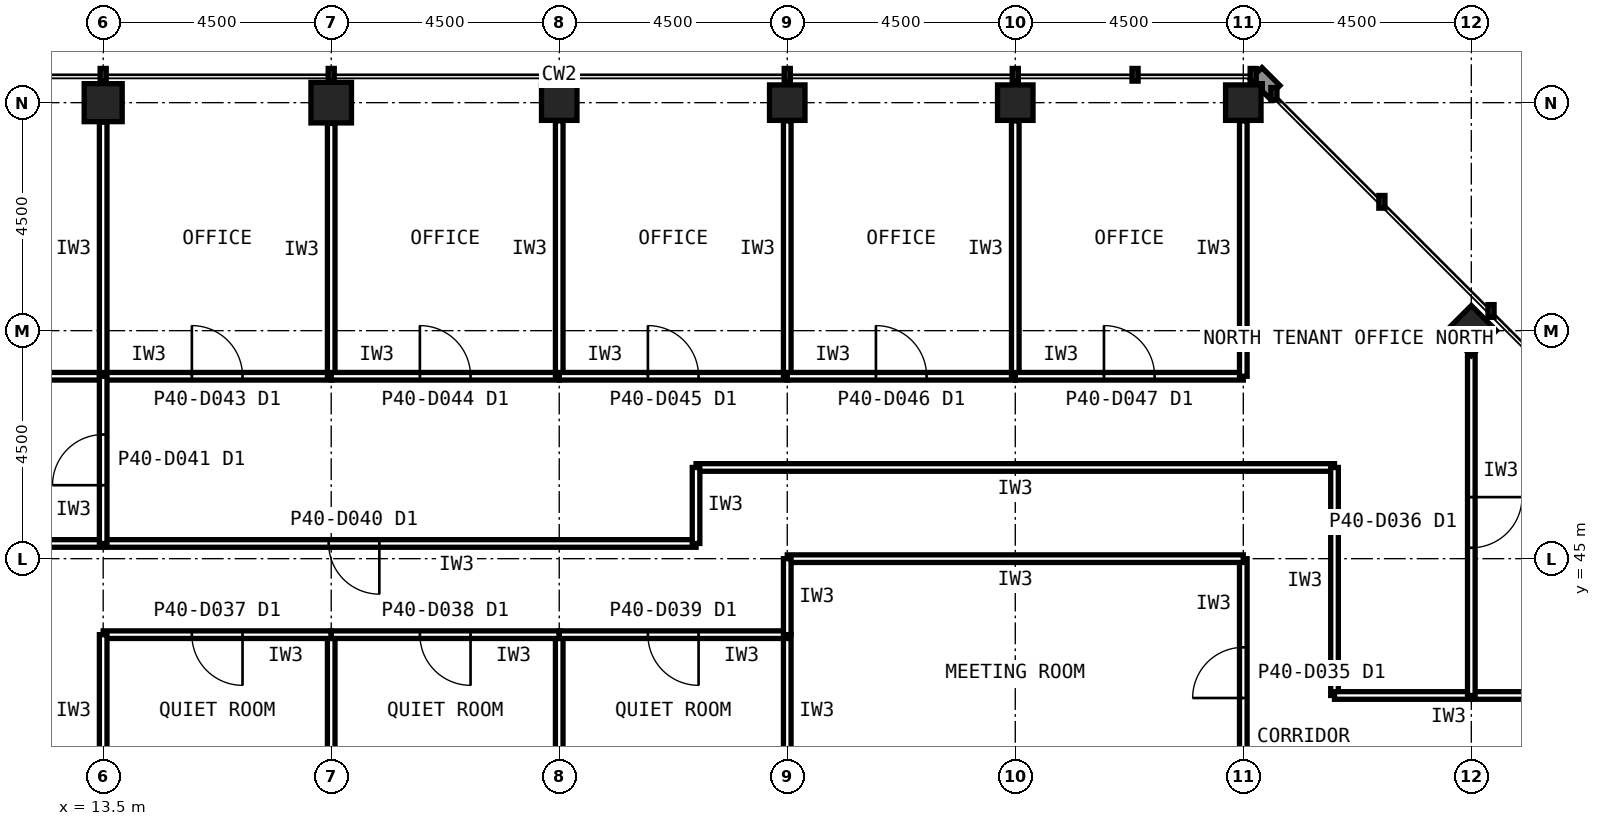
"""IFC4 building model, lengths in metres.
Left out: names, types, materials, properties, quantities, classifications, styles, units other than length and angle.
Written with IfcOpenShell. Run it as: python <this file> out.ifc"""

import sys

from ifc_helpers import new_model, si_unit, direction, frame, frame_2d, origin, origin_2d, place, context, subcontext, project, spatial, rectangle, hollow_rectangle, extrude, element, fill, save


model = new_model("IFC4")
c1 = context("Model", 3, precision=1e-05, world=origin(), true_north=direction((0.0, 1.0)))
c2 = subcontext(c1, "Body", "Model", "MODEL_VIEW")
j1 = project(units=[si_unit("LENGTHUNIT", "METRE"), si_unit("PLANEANGLEUNIT", "RADIAN")], contexts=[c1])
p1 = place(None, origin())
s1 = spatial("IfcSite", under=j1, at=p1, CompositionType="ELEMENT")
p2 = place(p1, origin())
s2 = spatial("IfcBuilding", under=s1, at=p2, CompositionType="ELEMENT")
p3 = place(p2, frame((0.0, 0.0, 167.6)))
s3 = spatial("IfcBuildingStorey", under=s2, at=p3, CompositionType="ELEMENT", Elevation=167.6)
for number, where, z_axis, x_axis in (
    (1, (36.0, 54.0, 0.0), (0.0, 0.0, 1.0), (1.0, 0.0, 0.0)),
    (2, (31.5, 54.0, 0.0), (0.0, 0.0, 1.0), (1.0, 0.0, 0.0)),
    (3, (27.0, 54.0, 0.0), (0.0, 0.0, 1.0), (1.0, 0.0, 0.0)),
    (4, (22.5, 54.0, 0.0), (0.0, 0.0, 1.0), (1.0, 0.0, 0.0)),
):
    element("IfcColumn", number, at=place(p3, frame(where, z_axis=z_axis, x_axis=x_axis)), inside=s3, PredefinedType="COLUMN", context=c2, shape_type="SweptSolid", body=[
        extrude(hollow_rectangle(XDim=0.7, YDim=0.7, WallThickness=0.036, at=origin_2d()), origin(), (0.0, 0.0, 1.0), 4.0),
    ])
p4 = place(p3, frame((18.0, 54.0, 0.0), z_axis=(0.0, 0.0, 1.0), x_axis=(1.0, 0.0, 0.0)))
e5 = element("IfcColumn", 5, at=p4, inside=s3, PredefinedType="COLUMN", context=c2, shape_type="SweptSolid", body=[
    extrude(hollow_rectangle(XDim=0.8, YDim=0.8, WallThickness=0.045, at=origin_2d()), origin(), (0.0, 0.0, 1.0), 4.0),
])
p5 = place(p3, frame((13.5, 54.0, 0.0), z_axis=(0.0, 0.0, 1.0), x_axis=(1.0, 0.0, 0.0)))
e6 = element("IfcColumn", 6, at=p5, inside=s3, PredefinedType="COLUMN", context=c2, shape_type="SweptSolid", body=[
    extrude(hollow_rectangle(XDim=0.75, YDim=0.75, WallThickness=0.04, at=origin_2d()), origin(), (0.0, 0.0, 1.0), 4.0),
])
p6 = place(p3, frame((40.5, 49.5, 0.0), z_axis=(0.0, 0.0, 1.0), x_axis=(0.707106781187, 0.707106781187, 0.0)))
e7 = element("IfcColumn", 7, at=p6, inside=s3, PredefinedType="COLUMN", context=c2, shape_type="SweptSolid", body=[
    extrude(hollow_rectangle(XDim=0.7, YDim=0.7, WallThickness=0.036, at=origin_2d()), origin(), (0.0, 0.0, 1.0), 4.0),
])
p7 = place(p3, frame((25.2, 45.3, 0.0), z_axis=(0.0, 0.0, 1.0), x_axis=(-1.0, 0.0, 0.0)))
e8 = element("IfcWall", 8, at=p7, inside=s3, PredefinedType="PARTITIONING", context=c2, shape_type="SweptSolid", body=[
    extrude(rectangle(XDim=13.5, YDim=0.15, at=frame_2d((6.75, 0.0))), origin(), (0.0, 0.0, 1.0), 3.84),
])
p8 = place(p7, frame((6.25, 0.0, 0.0)))
e9 = element("IfcOpeningElement", 9, at=p8, cuts=e8, PredefinedType="OPENING", context=c2, shape_type="SweptSolid", body=[
    extrude(rectangle(XDim=1.0, YDim=2.1, at=frame_2d((0.5, 1.05))), frame((0.0, 0.085, 0.0), z_axis=(0.0, -1.0, 0.0), x_axis=(1.0, 0.0, 0.0)), (0.0, 0.0, 1.0), 0.17),
])
p9 = place(p3, frame((37.8, 46.8, 0.0), z_axis=(0.0, 0.0, 1.0), x_axis=(-1.0, 0.0, 0.0)))
e10 = element("IfcWall", 10, at=p9, inside=s3, PredefinedType="PARTITIONING", context=c2, shape_type="SweptSolid", body=[
    extrude(rectangle(XDim=12.6, YDim=0.15, at=frame_2d((6.3, 0.0))), origin(), (0.0, 0.0, 1.0), 3.84),
])
for number, where, z_axis, x_axis in (
    (11, (37.8, 42.3, 0.0), (0.0, 0.0, 1.0), (0.0, 1.0, 0.0)),
    (12, (42.3, 42.3, 0.0), (0.0, 0.0, 1.0), (-1.0, 0.0, 0.0)),
):
    element("IfcWall", number, at=place(p3, frame(where, z_axis=z_axis, x_axis=x_axis)), inside=s3, PredefinedType="PARTITIONING", context=c2, shape_type="SweptSolid", body=[
        extrude(rectangle(XDim=4.5, YDim=0.15, at=frame_2d((2.25, 0.0))), origin(), (0.0, 0.0, 1.0), 3.84),
    ])
p10 = place(p3, frame((25.2, 46.8, 0.0), z_axis=(0.0, 0.0, 1.0), x_axis=(0.0, -1.0, 0.0)))
e13 = element("IfcWall", 13, at=p10, inside=s3, PredefinedType="PARTITIONING", context=c2, shape_type="SweptSolid", body=[
    extrude(rectangle(XDim=1.5, YDim=0.15, at=frame_2d((0.75, 0.0))), origin(), (0.0, 0.0, 1.0), 3.84),
])
p11 = place(p3, frame((9.0, 48.6, 0.0), z_axis=(0.0, 0.0, 1.0), x_axis=(1.0, 0.0, 0.0)))
e14 = element("IfcWall", 14, at=p11, inside=s3, PredefinedType="PARTITIONING", context=c2, shape_type="SweptSolid", body=[
    extrude(rectangle(XDim=4.5, YDim=0.15, at=frame_2d((2.25, 0.0))), origin(), (0.0, 0.0, 1.0), 3.84),
])
p12 = place(p11, frame((1.75, 0.0, 0.0)))
e15 = element("IfcOpeningElement", 15, at=p12, cuts=e14, PredefinedType="OPENING", context=c2, shape_type="SweptSolid", body=[
    extrude(rectangle(XDim=1.0, YDim=2.1, at=frame_2d((0.5, 1.05))), frame((0.0, 0.085, 0.0), z_axis=(0.0, -1.0, 0.0), x_axis=(1.0, 0.0, 0.0)), (0.0, 0.0, 1.0), 0.17),
])
p13 = place(p3, frame((13.5, 48.6, 0.0), z_axis=(0.0, 0.0, 1.0), x_axis=(0.0, 1.0, 0.0)))
e16 = element("IfcWall", 16, at=p13, inside=s3, PredefinedType="PARTITIONING", context=c2, shape_type="SweptSolid", body=[
    extrude(rectangle(XDim=5.015, YDim=0.15, at=frame_2d((2.507, 0.0))), origin(), (0.0, 0.0, 1.0), 2.989),
])
p14 = place(p3, frame((13.5, 48.6, 0.0), z_axis=(0.0, 0.0, 1.0), x_axis=(1.0, 0.0, 0.0)))
e17 = element("IfcWall", 17, at=p14, inside=s3, PredefinedType="PARTITIONING", context=c2, shape_type="SweptSolid", body=[
    extrude(rectangle(XDim=4.5, YDim=0.15, at=frame_2d((2.25, 0.0))), origin(), (0.0, 0.0, 1.0), 3.84),
])
p15 = place(p14, frame((1.75, 0.0, 0.0)))
e18 = element("IfcOpeningElement", 18, at=p15, cuts=e17, PredefinedType="OPENING", context=c2, shape_type="SweptSolid", body=[
    extrude(rectangle(XDim=1.0, YDim=2.1, at=frame_2d((0.5, 1.05))), frame((0.0, 0.085, 0.0), z_axis=(0.0, -1.0, 0.0), x_axis=(1.0, 0.0, 0.0)), (0.0, 0.0, 1.0), 0.17),
])
p16 = place(p3, frame((18.0, 48.6, 0.0), z_axis=(0.0, 0.0, 1.0), x_axis=(0.0, 1.0, 0.0)))
e19 = element("IfcWall", 19, at=p16, inside=s3, PredefinedType="PARTITIONING", context=c2, shape_type="SweptSolid", body=[
    extrude(rectangle(XDim=4.99, YDim=0.15, at=frame_2d((2.495, 0.0))), origin(), (0.0, 0.0, 1.0), 2.989),
])
p17 = place(p3, frame((18.0, 48.6, 0.0), z_axis=(0.0, 0.0, 1.0), x_axis=(1.0, 0.0, 0.0)))
e20 = element("IfcWall", 20, at=p17, inside=s3, PredefinedType="PARTITIONING", context=c2, shape_type="SweptSolid", body=[
    extrude(rectangle(XDim=4.5, YDim=0.15, at=frame_2d((2.25, 0.0))), origin(), (0.0, 0.0, 1.0), 3.84),
])
p18 = place(p17, frame((1.75, 0.0, 0.0)))
e21 = element("IfcOpeningElement", 21, at=p18, cuts=e20, PredefinedType="OPENING", context=c2, shape_type="SweptSolid", body=[
    extrude(rectangle(XDim=1.0, YDim=2.1, at=frame_2d((0.5, 1.05))), frame((0.0, 0.085, 0.0), z_axis=(0.0, -1.0, 0.0), x_axis=(1.0, 0.0, 0.0)), (0.0, 0.0, 1.0), 0.17),
])
p19 = place(p3, frame((22.5, 48.6, 0.0), z_axis=(0.0, 0.0, 1.0), x_axis=(0.0, 1.0, 0.0)))
e22 = element("IfcWall", 22, at=p19, inside=s3, PredefinedType="PARTITIONING", context=c2, shape_type="SweptSolid", body=[
    extrude(rectangle(XDim=5.04, YDim=0.15, at=frame_2d((2.52, 0.0))), origin(), (0.0, 0.0, 1.0), 2.989),
])
p20 = place(p3, frame((22.5, 48.6, 0.0), z_axis=(0.0, 0.0, 1.0), x_axis=(1.0, 0.0, 0.0)))
e23 = element("IfcWall", 23, at=p20, inside=s3, PredefinedType="PARTITIONING", context=c2, shape_type="SweptSolid", body=[
    extrude(rectangle(XDim=4.5, YDim=0.15, at=frame_2d((2.25, 0.0))), origin(), (0.0, 0.0, 1.0), 3.84),
])
p21 = place(p20, frame((1.75, 0.0, 0.0)))
e24 = element("IfcOpeningElement", 24, at=p21, cuts=e23, PredefinedType="OPENING", context=c2, shape_type="SweptSolid", body=[
    extrude(rectangle(XDim=1.0, YDim=2.1, at=frame_2d((0.5, 1.05))), frame((0.0, 0.085, 0.0), z_axis=(0.0, -1.0, 0.0), x_axis=(1.0, 0.0, 0.0)), (0.0, 0.0, 1.0), 0.17),
])
p22 = place(p3, frame((27.0, 48.6, 0.0), z_axis=(0.0, 0.0, 1.0), x_axis=(0.0, 1.0, 0.0)))
e25 = element("IfcWall", 25, at=p22, inside=s3, PredefinedType="PARTITIONING", context=c2, shape_type="SweptSolid", body=[
    extrude(rectangle(XDim=5.04, YDim=0.15, at=frame_2d((2.52, 0.0))), origin(), (0.0, 0.0, 1.0), 2.989),
])
p23 = place(p3, frame((27.0, 48.6, 0.0), z_axis=(0.0, 0.0, 1.0), x_axis=(1.0, 0.0, 0.0)))
e26 = element("IfcWall", 26, at=p23, inside=s3, PredefinedType="PARTITIONING", context=c2, shape_type="SweptSolid", body=[
    extrude(rectangle(XDim=4.5, YDim=0.15, at=frame_2d((2.25, 0.0))), origin(), (0.0, 0.0, 1.0), 3.84),
])
p24 = place(p23, frame((1.75, 0.0, 0.0)))
e27 = element("IfcOpeningElement", 27, at=p24, cuts=e26, PredefinedType="OPENING", context=c2, shape_type="SweptSolid", body=[
    extrude(rectangle(XDim=1.0, YDim=2.1, at=frame_2d((0.5, 1.05))), frame((0.0, 0.085, 0.0), z_axis=(0.0, -1.0, 0.0), x_axis=(1.0, 0.0, 0.0)), (0.0, 0.0, 1.0), 0.17),
])
p25 = place(p3, frame((31.5, 48.6, 0.0), z_axis=(0.0, 0.0, 1.0), x_axis=(0.0, 1.0, 0.0)))
e28 = element("IfcWall", 28, at=p25, inside=s3, PredefinedType="PARTITIONING", context=c2, shape_type="SweptSolid", body=[
    extrude(rectangle(XDim=5.04, YDim=0.15, at=frame_2d((2.52, 0.0))), origin(), (0.0, 0.0, 1.0), 2.989),
])
p26 = place(p3, frame((31.5, 48.6, 0.0), z_axis=(0.0, 0.0, 1.0), x_axis=(1.0, 0.0, 0.0)))
e29 = element("IfcWall", 29, at=p26, inside=s3, PredefinedType="PARTITIONING", context=c2, shape_type="SweptSolid", body=[
    extrude(rectangle(XDim=4.5, YDim=0.15, at=frame_2d((2.25, 0.0))), origin(), (0.0, 0.0, 1.0), 3.84),
])
p27 = place(p26, frame((1.75, 0.0, 0.0)))
e30 = element("IfcOpeningElement", 30, at=p27, cuts=e29, PredefinedType="OPENING", context=c2, shape_type="SweptSolid", body=[
    extrude(rectangle(XDim=1.0, YDim=2.1, at=frame_2d((0.5, 1.05))), frame((0.0, 0.085, 0.0), z_axis=(0.0, -1.0, 0.0), x_axis=(1.0, 0.0, 0.0)), (0.0, 0.0, 1.0), 0.17),
])
p28 = place(p3, frame((36.0, 48.6, 0.0), z_axis=(0.0, 0.0, 1.0), x_axis=(0.0, 1.0, 0.0)))
e31 = element("IfcWall", 31, at=p28, inside=s3, PredefinedType="PARTITIONING", context=c2, shape_type="SweptSolid", body=[
    extrude(rectangle(XDim=5.04, YDim=0.15, at=frame_2d((2.52, 0.0))), origin(), (0.0, 0.0, 1.0), 2.989),
])
p29 = place(p3, frame((18.0, 40.5, 0.0), z_axis=(0.0, 0.0, 1.0), x_axis=(0.0, 1.0, 0.0)))
e32 = element("IfcWall", 32, at=p29, inside=s3, PredefinedType="PARTITIONING", context=c2, shape_type="SweptSolid", body=[
    extrude(rectangle(XDim=3.0, YDim=0.15, at=frame_2d((1.5, 0.0))), origin(), (0.0, 0.0, 1.0), 2.989),
])
p30 = place(p3, frame((18.0, 43.5, 0.0), z_axis=(0.0, 0.0, 1.0), x_axis=(-1.0, 0.0, 0.0)))
e33 = element("IfcWall", 33, at=p30, inside=s3, PredefinedType="PARTITIONING", context=c2, shape_type="SweptSolid", body=[
    extrude(rectangle(XDim=4.5, YDim=0.15, at=frame_2d((2.25, 0.0))), origin(), (0.0, 0.0, 1.0), 3.84),
])
p31 = place(p30, frame((1.75, 0.0, 0.0)))
e34 = element("IfcOpeningElement", 34, at=p31, cuts=e33, PredefinedType="OPENING", context=c2, shape_type="SweptSolid", body=[
    extrude(rectangle(XDim=1.0, YDim=2.1, at=frame_2d((0.5, 1.05))), frame((0.0, 0.085, 0.0), z_axis=(0.0, -1.0, 0.0), x_axis=(1.0, 0.0, 0.0)), (0.0, 0.0, 1.0), 0.17),
])
for number, where, z_axis, x_axis in (
    (35, (13.5, 43.5, 0.0), (0.0, 0.0, 1.0), (0.0, -1.0, 0.0)),
    (36, (22.5, 40.5, 0.0), (0.0, 0.0, 1.0), (0.0, 1.0, 0.0)),
):
    element("IfcWall", number, at=place(p3, frame(where, z_axis=z_axis, x_axis=x_axis)), inside=s3, PredefinedType="PARTITIONING", context=c2, shape_type="SweptSolid", body=[
        extrude(rectangle(XDim=3.0, YDim=0.15, at=frame_2d((1.5, 0.0))), origin(), (0.0, 0.0, 1.0), 2.989),
    ])
p32 = place(p3, frame((22.5, 43.5, 0.0), z_axis=(0.0, 0.0, 1.0), x_axis=(-1.0, 0.0, 0.0)))
e37 = element("IfcWall", 37, at=p32, inside=s3, PredefinedType="PARTITIONING", context=c2, shape_type="SweptSolid", body=[
    extrude(rectangle(XDim=4.5, YDim=0.15, at=frame_2d((2.25, 0.0))), origin(), (0.0, 0.0, 1.0), 3.84),
])
p33 = place(p32, frame((1.75, 0.0, 0.0)))
e38 = element("IfcOpeningElement", 38, at=p33, cuts=e37, PredefinedType="OPENING", context=c2, shape_type="SweptSolid", body=[
    extrude(rectangle(XDim=1.0, YDim=2.1, at=frame_2d((0.5, 1.05))), frame((0.0, 0.085, 0.0), z_axis=(0.0, -1.0, 0.0), x_axis=(1.0, 0.0, 0.0)), (0.0, 0.0, 1.0), 0.17),
])
p34 = place(p3, frame((27.0, 40.5, 0.0), z_axis=(0.0, 0.0, 1.0), x_axis=(0.0, 1.0, 0.0)))
e39 = element("IfcWall", 39, at=p34, inside=s3, PredefinedType="PARTITIONING", context=c2, shape_type="SweptSolid", body=[
    extrude(rectangle(XDim=3.0, YDim=0.15, at=frame_2d((1.5, 0.0))), origin(), (0.0, 0.0, 1.0), 2.989),
])
p35 = place(p3, frame((27.0, 43.5, 0.0), z_axis=(0.0, 0.0, 1.0), x_axis=(-1.0, 0.0, 0.0)))
e40 = element("IfcWall", 40, at=p35, inside=s3, PredefinedType="PARTITIONING", context=c2, shape_type="SweptSolid", body=[
    extrude(rectangle(XDim=4.5, YDim=0.15, at=frame_2d((2.25, 0.0))), origin(), (0.0, 0.0, 1.0), 3.84),
])
p36 = place(p35, frame((1.75, 0.0, 0.0)))
e41 = element("IfcOpeningElement", 41, at=p36, cuts=e40, PredefinedType="OPENING", context=c2, shape_type="SweptSolid", body=[
    extrude(rectangle(XDim=1.0, YDim=2.1, at=frame_2d((0.5, 1.05))), frame((0.0, 0.085, 0.0), z_axis=(0.0, -1.0, 0.0), x_axis=(1.0, 0.0, 0.0)), (0.0, 0.0, 1.0), 0.17),
])
p37 = place(p3, frame((36.0, 40.5, 0.0), z_axis=(0.0, 0.0, 1.0), x_axis=(0.0, 1.0, 0.0)))
e42 = element("IfcWall", 42, at=p37, inside=s3, PredefinedType="PARTITIONING", context=c2, shape_type="SweptSolid", body=[
    extrude(rectangle(XDim=4.5, YDim=0.15, at=frame_2d((2.25, 0.0))), origin(), (0.0, 0.0, 1.0), 2.989),
])
p38 = place(p37, frame((1.75, 0.0, 0.0)))
e43 = element("IfcOpeningElement", 43, at=p38, cuts=e42, PredefinedType="OPENING", context=c2, shape_type="SweptSolid", body=[
    extrude(rectangle(XDim=1.0, YDim=2.1, at=frame_2d((0.5, 1.05))), frame((0.0, 0.085, 0.0), z_axis=(0.0, -1.0, 0.0), x_axis=(1.0, 0.0, 0.0)), (0.0, 0.0, 1.0), 0.17),
])
p39 = place(p3, frame((36.0, 45.0, 0.0), z_axis=(0.0, 0.0, 1.0), x_axis=(-1.0, 0.0, 0.0)))
e44 = element("IfcWall", 44, at=p39, inside=s3, PredefinedType="PARTITIONING", context=c2, shape_type="SweptSolid", body=[
    extrude(rectangle(XDim=9.0, YDim=0.15, at=frame_2d((4.5, 0.0))), origin(), (0.0, 0.0, 1.0), 3.84),
])
p40 = place(p3, frame((27.0, 45.0, 0.0), z_axis=(0.0, 0.0, 1.0), x_axis=(0.0, -1.0, 0.0)))
e45 = element("IfcWall", 45, at=p40, inside=s3, PredefinedType="PARTITIONING", context=c2, shape_type="SweptSolid", body=[
    extrude(rectangle(XDim=1.5, YDim=0.15, at=frame_2d((0.75, 0.0))), origin(), (0.0, 0.0, 1.0), 2.989),
])
p41 = place(p3, frame((40.5, 49.13, 0.0), z_axis=(0.0, 0.0, 1.0), x_axis=(0.0, -1.0, 0.0)))
e46 = element("IfcWall", 46, at=p41, inside=s3, PredefinedType="PARTITIONING", context=c2, shape_type="SweptSolid", body=[
    extrude(rectangle(XDim=6.83, YDim=0.15, at=frame_2d((3.415, 0.0))), origin(), (0.0, 0.0, 1.0), 2.989),
])
p42 = place(p41, frame((2.915, 0.0, 0.0)))
e47 = element("IfcOpeningElement", 47, at=p42, cuts=e46, PredefinedType="OPENING", context=c2, shape_type="SweptSolid", body=[
    extrude(rectangle(XDim=1.0, YDim=2.1, at=frame_2d((0.5, 1.05))), frame((0.0, 0.085, 0.0), z_axis=(0.0, -1.0, 0.0), x_axis=(1.0, 0.0, 0.0)), (0.0, 0.0, 1.0), 0.17),
])
p43 = place(p3, frame((13.5, 45.3, 0.0), z_axis=(0.0, 0.0, 1.0), x_axis=(0.0, 1.0, 0.0)))
e48 = element("IfcWall", 48, at=p43, inside=s3, PredefinedType="PARTITIONING", context=c2, shape_type="SweptSolid", body=[
    extrude(rectangle(XDim=3.3, YDim=0.15, at=frame_2d((1.65, 0.0))), origin(), (0.0, 0.0, 1.0), 2.989),
])
p44 = place(p43, frame((1.15, 0.0, 0.0)))
e49 = element("IfcOpeningElement", 49, at=p44, cuts=e48, PredefinedType="OPENING", context=c2, shape_type="SweptSolid", body=[
    extrude(rectangle(XDim=1.0, YDim=2.1, at=frame_2d((0.5, 1.05))), frame((0.0, 0.085, 0.0), z_axis=(0.0, -1.0, 0.0), x_axis=(1.0, 0.0, 0.0)), (0.0, 0.0, 1.0), 0.17),
])
p45 = place(p8, origin())
e50 = element("IfcDoor", 50, at=p45, inside=s3, OperationType="SINGLE_SWING_LEFT", PredefinedType="DOOR", context=c2, shape_type="SweptSolid", body=[
    extrude(rectangle(XDim=1.0, YDim=2.1, at=frame_2d((0.5, 1.05))), frame((0.0, 0.025, 0.0), z_axis=(0.0, -1.0, 0.0), x_axis=(1.0, 0.0, 0.0)), (0.0, 0.0, 1.0), 0.05),
])
fill(e9, e50)
p46 = place(p15, origin())
e51 = element("IfcDoor", 51, at=p46, inside=s3, OperationType="SINGLE_SWING_LEFT", PredefinedType="DOOR", context=c2, shape_type="SweptSolid", body=[
    extrude(rectangle(XDim=1.0, YDim=2.1, at=frame_2d((0.5, 1.05))), frame((0.0, 0.025, 0.0), z_axis=(0.0, -1.0, 0.0), x_axis=(1.0, 0.0, 0.0)), (0.0, 0.0, 1.0), 0.05),
])
fill(e18, e51)
p47 = place(p18, origin())
e52 = element("IfcDoor", 52, at=p47, inside=s3, OperationType="SINGLE_SWING_LEFT", PredefinedType="DOOR", context=c2, shape_type="SweptSolid", body=[
    extrude(rectangle(XDim=1.0, YDim=2.1, at=frame_2d((0.5, 1.05))), frame((0.0, 0.025, 0.0), z_axis=(0.0, -1.0, 0.0), x_axis=(1.0, 0.0, 0.0)), (0.0, 0.0, 1.0), 0.05),
])
fill(e21, e52)
p48 = place(p21, origin())
e53 = element("IfcDoor", 53, at=p48, inside=s3, OperationType="SINGLE_SWING_LEFT", PredefinedType="DOOR", context=c2, shape_type="SweptSolid", body=[
    extrude(rectangle(XDim=1.0, YDim=2.1, at=frame_2d((0.5, 1.05))), frame((0.0, 0.025, 0.0), z_axis=(0.0, -1.0, 0.0), x_axis=(1.0, 0.0, 0.0)), (0.0, 0.0, 1.0), 0.05),
])
fill(e24, e53)
p49 = place(p24, origin())
e54 = element("IfcDoor", 54, at=p49, inside=s3, OperationType="SINGLE_SWING_LEFT", PredefinedType="DOOR", context=c2, shape_type="SweptSolid", body=[
    extrude(rectangle(XDim=1.0, YDim=2.1, at=frame_2d((0.5, 1.05))), frame((0.0, 0.025, 0.0), z_axis=(0.0, -1.0, 0.0), x_axis=(1.0, 0.0, 0.0)), (0.0, 0.0, 1.0), 0.05),
])
fill(e27, e54)
p50 = place(p27, origin())
e55 = element("IfcDoor", 55, at=p50, inside=s3, OperationType="SINGLE_SWING_LEFT", PredefinedType="DOOR", context=c2, shape_type="SweptSolid", body=[
    extrude(rectangle(XDim=1.0, YDim=2.1, at=frame_2d((0.5, 1.05))), frame((0.0, 0.025, 0.0), z_axis=(0.0, -1.0, 0.0), x_axis=(1.0, 0.0, 0.0)), (0.0, 0.0, 1.0), 0.05),
])
fill(e30, e55)
p51 = place(p31, origin())
e56 = element("IfcDoor", 56, at=p51, inside=s3, OperationType="SINGLE_SWING_LEFT", PredefinedType="DOOR", context=c2, shape_type="SweptSolid", body=[
    extrude(rectangle(XDim=1.0, YDim=2.1, at=frame_2d((0.5, 1.05))), frame((0.0, 0.025, 0.0), z_axis=(0.0, -1.0, 0.0), x_axis=(1.0, 0.0, 0.0)), (0.0, 0.0, 1.0), 0.05),
])
fill(e34, e56)
p52 = place(p33, origin())
e57 = element("IfcDoor", 57, at=p52, inside=s3, OperationType="SINGLE_SWING_LEFT", PredefinedType="DOOR", context=c2, shape_type="SweptSolid", body=[
    extrude(rectangle(XDim=1.0, YDim=2.1, at=frame_2d((0.5, 1.05))), frame((0.0, 0.025, 0.0), z_axis=(0.0, -1.0, 0.0), x_axis=(1.0, 0.0, 0.0)), (0.0, 0.0, 1.0), 0.05),
])
fill(e38, e57)
p53 = place(p36, origin())
e58 = element("IfcDoor", 58, at=p53, inside=s3, OperationType="SINGLE_SWING_LEFT", PredefinedType="DOOR", context=c2, shape_type="SweptSolid", body=[
    extrude(rectangle(XDim=1.0, YDim=2.1, at=frame_2d((0.5, 1.05))), frame((0.0, 0.025, 0.0), z_axis=(0.0, -1.0, 0.0), x_axis=(1.0, 0.0, 0.0)), (0.0, 0.0, 1.0), 0.05),
])
fill(e41, e58)
p54 = place(p38, origin())
e59 = element("IfcDoor", 59, at=p54, inside=s3, OperationType="SINGLE_SWING_LEFT", PredefinedType="DOOR", context=c2, shape_type="SweptSolid", body=[
    extrude(rectangle(XDim=1.0, YDim=2.1, at=frame_2d((0.5, 1.05))), frame((0.0, 0.025, 0.0), z_axis=(0.0, -1.0, 0.0), x_axis=(1.0, 0.0, 0.0)), (0.0, 0.0, 1.0), 0.05),
])
fill(e43, e59)
p55 = place(p42, origin())
e60 = element("IfcDoor", 60, at=p55, inside=s3, OperationType="SINGLE_SWING_LEFT", PredefinedType="DOOR", context=c2, shape_type="SweptSolid", body=[
    extrude(rectangle(XDim=1.0, YDim=2.1, at=frame_2d((0.5, 1.05))), frame((0.0, 0.025, 0.0), z_axis=(0.0, -1.0, 0.0), x_axis=(1.0, 0.0, 0.0)), (0.0, 0.0, 1.0), 0.05),
])
fill(e47, e60)
p56 = place(p44, origin())
e61 = element("IfcDoor", 61, at=p56, inside=s3, OperationType="SINGLE_SWING_LEFT", PredefinedType="DOOR", context=c2, shape_type="SweptSolid", body=[
    extrude(rectangle(XDim=1.0, YDim=2.1, at=frame_2d((0.5, 1.05))), frame((0.0, 0.025, 0.0), z_axis=(0.0, -1.0, 0.0), x_axis=(1.0, 0.0, 0.0)), (0.0, 0.0, 1.0), 0.05),
])
fill(e49, e61)
save(model, sys.argv[1])
